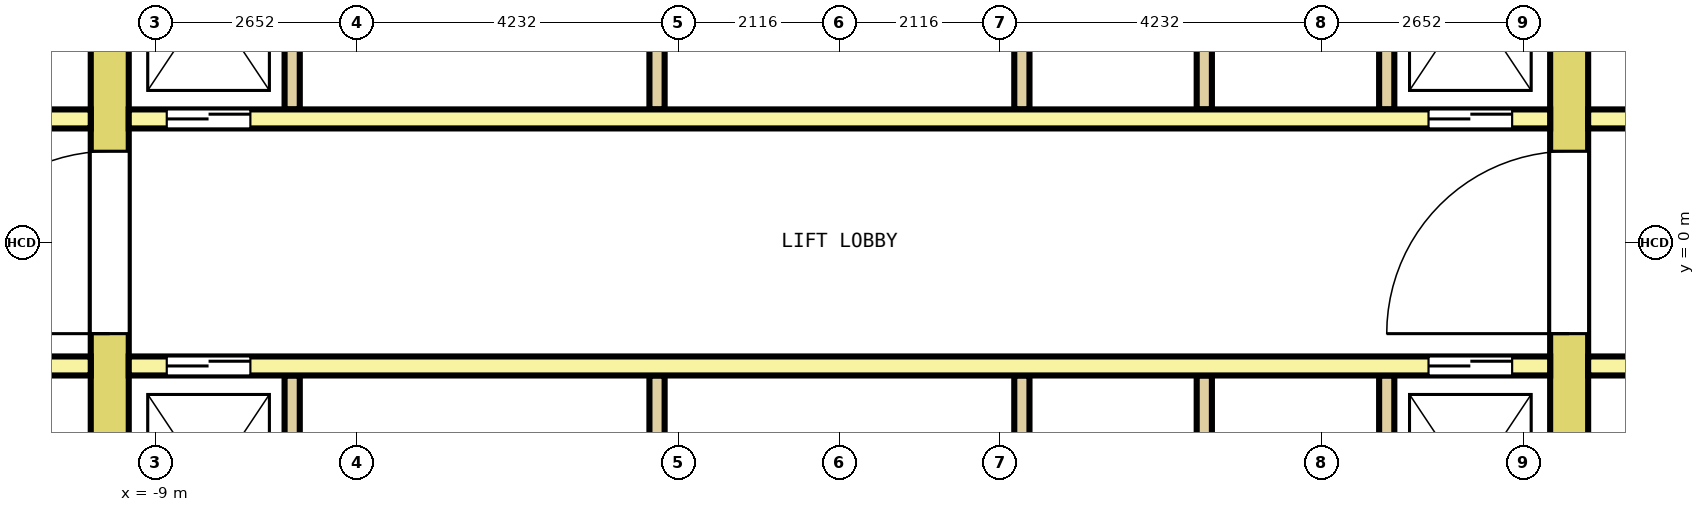
"""IFC4 building model, lengths in metres.
Left out: names, types, materials, properties, quantities, classifications, styles, units other than length and angle.
Written with IfcOpenShell. Run it as: python <this file> out.ifc"""

import sys

from ifc_helpers import new_model, si_unit, direction, frame, frame_2d, origin, place, context, subcontext, project, spatial, rectangle, extrude, element, fill, save


model = new_model("IFC4")
c1 = context("Model", 3, precision=1e-05, world=origin(), true_north=direction((0.0, 1.0)))
c2 = subcontext(c1, "Body", "Model", "MODEL_VIEW")
j1 = project(units=[si_unit("LENGTHUNIT", "METRE"), si_unit("PLANEANGLEUNIT", "RADIAN")], contexts=[c1])
p1 = place(None, origin())
s1 = spatial("IfcSite", under=j1, at=p1, CompositionType="ELEMENT")
p2 = place(p1, origin())
s2 = spatial("IfcBuilding", under=s1, at=p2, CompositionType="ELEMENT")
p3 = place(p2, frame((0.0, 0.0, 67.4)))
s3 = spatial("IfcBuildingStorey", under=s2, at=p3, CompositionType="ELEMENT", Elevation=67.4)
p4 = place(p3, frame((-9.6, -7.7, 0.0), z_axis=(0.0, 0.0, 1.0), x_axis=(0.0, 1.0, 0.0)))
e1 = element("IfcWall", 1, at=p4, inside=s3, PredefinedType="SHEAR", context=c2, shape_type="SweptSolid", body=[
    extrude(rectangle(XDim=15.4, YDim=0.5, at=frame_2d((7.7, 0.0))), origin(), (0.0, 0.0, 1.0), 4.1),
])
p5 = place(p4, frame((6.5, 0.0, 0.0)))
e2 = element("IfcOpeningElement", 2, at=p5, cuts=e1, PredefinedType="OPENING", context=c2, shape_type="SweptSolid", body=[
    extrude(rectangle(XDim=2.4, YDim=2.1, at=frame_2d((1.2, 1.05))), frame((0.0, 0.26, 0.0), z_axis=(0.0, -1.0, 0.0), x_axis=(1.0, 0.0, 0.0)), (0.0, 0.0, 1.0), 0.52),
])
p6 = place(p4, frame((13.4, 0.0, 0.0)))
e3 = element("IfcOpeningElement", 3, at=p6, cuts=e1, PredefinedType="OPENING", context=c2, shape_type="SweptSolid", body=[
    extrude(rectangle(XDim=1.2, YDim=2.1, at=frame_2d((0.6, 1.05))), frame((0.0, 0.26, 0.0), z_axis=(0.0, -1.0, 0.0), x_axis=(1.0, 0.0, 0.0)), (0.0, 0.0, 1.0), 0.52),
])
p7 = place(p4, frame((0.8, 0.0, 0.0)))
e4 = element("IfcOpeningElement", 4, at=p7, cuts=e1, PredefinedType="OPENING", context=c2, shape_type="SweptSolid", body=[
    extrude(rectangle(XDim=1.2, YDim=2.1, at=frame_2d((0.6, 1.05))), frame((0.0, 0.26, 0.0), z_axis=(0.0, -1.0, 0.0), x_axis=(1.0, 0.0, 0.0)), (0.0, 0.0, 1.0), 0.52),
])
p8 = place(p3, frame((9.6, -7.7, 0.0), z_axis=(0.0, 0.0, 1.0), x_axis=(0.0, 1.0, 0.0)))
e5 = element("IfcWall", 5, at=p8, inside=s3, PredefinedType="SHEAR", context=c2, shape_type="SweptSolid", body=[
    extrude(rectangle(XDim=15.4, YDim=0.5, at=frame_2d((7.7, 0.0))), origin(), (0.0, 0.0, 1.0), 4.1),
])
p9 = place(p8, frame((6.5, 0.0, 0.0)))
e6 = element("IfcOpeningElement", 6, at=p9, cuts=e5, PredefinedType="OPENING", context=c2, shape_type="SweptSolid", body=[
    extrude(rectangle(XDim=2.4, YDim=2.1, at=frame_2d((1.2, 1.05))), frame((0.0, 0.26, 0.0), z_axis=(0.0, -1.0, 0.0), x_axis=(1.0, 0.0, 0.0)), (0.0, 0.0, 1.0), 0.52),
])
p10 = place(p8, frame((13.4, 0.0, 0.0)))
e7 = element("IfcOpeningElement", 7, at=p10, cuts=e5, PredefinedType="OPENING", context=c2, shape_type="SweptSolid", body=[
    extrude(rectangle(XDim=1.2, YDim=2.1, at=frame_2d((0.6, 1.05))), frame((0.0, 0.26, 0.0), z_axis=(0.0, -1.0, 0.0), x_axis=(1.0, 0.0, 0.0)), (0.0, 0.0, 1.0), 0.52),
])
p11 = place(p8, frame((0.9, 0.0, 0.0)))
e8 = element("IfcOpeningElement", 8, at=p11, cuts=e5, PredefinedType="OPENING", context=c2, shape_type="SweptSolid", body=[
    extrude(rectangle(XDim=1.0, YDim=2.1, at=frame_2d((0.5, 1.05))), frame((0.0, 0.26, 0.0), z_axis=(0.0, -1.0, 0.0), x_axis=(1.0, 0.0, 0.0)), (0.0, 0.0, 1.0), 0.52),
])
p12 = place(p3, frame((-12.75, 1.625, 0.0), z_axis=(0.0, 0.0, 1.0), x_axis=(1.0, 0.0, 0.0)))
e9 = element("IfcWall", 9, at=p12, inside=s3, PredefinedType="SOLIDWALL", context=c2, shape_type="SweptSolid", body=[
    extrude(rectangle(XDim=2.9, YDim=0.25, at=frame_2d((1.45, 0.0))), origin(), (0.0, 0.0, 1.0), 4.1),
])
p13 = place(p12, frame((0.9, 0.0, 0.0)))
e10 = element("IfcOpeningElement", 10, at=p13, cuts=e9, PredefinedType="OPENING", context=c2, shape_type="SweptSolid", body=[
    extrude(rectangle(XDim=1.1, YDim=2.1, at=frame_2d((0.55, 1.05))), frame((0.0, 0.135, 0.0), z_axis=(0.0, -1.0, 0.0), x_axis=(1.0, 0.0, 0.0)), (0.0, 0.0, 1.0), 0.27),
])
p14 = place(p3, frame((-9.35, 1.625, 0.0), z_axis=(0.0, 0.0, 1.0), x_axis=(1.0, 0.0, 0.0)))
e11 = element("IfcWall", 11, at=p14, inside=s3, PredefinedType="SOLIDWALL", context=c2, shape_type="SweptSolid", body=[
    extrude(rectangle(XDim=18.7, YDim=0.25, at=frame_2d((9.35, 0.0))), origin(), (0.0, 0.0, 1.0), 4.1),
])
p15 = place(p14, frame((0.5, 0.0, 0.0)))
e12 = element("IfcOpeningElement", 12, at=p15, cuts=e11, PredefinedType="OPENING", context=c2, shape_type="SweptSolid", body=[
    extrude(rectangle(XDim=1.1, YDim=2.1, at=frame_2d((0.55, 1.05))), frame((0.0, 0.135, 0.0), z_axis=(0.0, -1.0, 0.0), x_axis=(1.0, 0.0, 0.0)), (0.0, 0.0, 1.0), 0.27),
])
p16 = place(p14, frame((17.1, 0.0, 0.0)))
e13 = element("IfcOpeningElement", 13, at=p16, cuts=e11, PredefinedType="OPENING", context=c2, shape_type="SweptSolid", body=[
    extrude(rectangle(XDim=1.1, YDim=2.1, at=frame_2d((0.55, 1.05))), frame((0.0, 0.135, 0.0), z_axis=(0.0, -1.0, 0.0), x_axis=(1.0, 0.0, 0.0)), (0.0, 0.0, 1.0), 0.27),
])
p17 = place(p3, frame((9.85, 1.625, 0.0), z_axis=(0.0, 0.0, 1.0), x_axis=(1.0, 0.0, 0.0)))
e14 = element("IfcWall", 14, at=p17, inside=s3, PredefinedType="SOLIDWALL", context=c2, shape_type="SweptSolid", body=[
    extrude(rectangle(XDim=2.9, YDim=0.25, at=frame_2d((1.45, 0.0))), origin(), (0.0, 0.0, 1.0), 4.1),
])
p18 = place(p17, frame((0.9, 0.0, 0.0)))
e15 = element("IfcOpeningElement", 15, at=p18, cuts=e14, PredefinedType="OPENING", context=c2, shape_type="SweptSolid", body=[
    extrude(rectangle(XDim=1.1, YDim=2.1, at=frame_2d((0.55, 1.05))), frame((0.0, 0.135, 0.0), z_axis=(0.0, -1.0, 0.0), x_axis=(1.0, 0.0, 0.0)), (0.0, 0.0, 1.0), 0.27),
])
for number, where, z_axis, x_axis in (
    (16, (-7.2, 1.75, 0.0), (0.0, 0.0, 1.0), (0.0, 1.0, 0.0)),
    (17, (-2.4, 1.75, 0.0), (0.0, 0.0, 1.0), (0.0, 1.0, 0.0)),
    (18, (2.4, 1.75, 0.0), (0.0, 0.0, 1.0), (0.0, 1.0, 0.0)),
    (19, (4.8, 1.75, 0.0), (0.0, 0.0, 1.0), (0.0, 1.0, 0.0)),
    (20, (7.2, 1.75, 0.0), (0.0, 0.0, 1.0), (0.0, 1.0, 0.0)),
):
    element("IfcWall", number, at=place(p3, frame(where, z_axis=z_axis, x_axis=x_axis)), inside=s3, PredefinedType="SOLIDWALL", context=c2, shape_type="SweptSolid", body=[
        extrude(rectangle(XDim=2.9, YDim=0.2, at=frame_2d((1.45, 0.0))), origin(), (0.0, 0.0, 1.0), 4.1),
    ])
p19 = place(p3, frame((-12.75, -1.625, 0.0), z_axis=(0.0, 0.0, 1.0), x_axis=(1.0, 0.0, 0.0)))
e21 = element("IfcWall", 21, at=p19, inside=s3, PredefinedType="SOLIDWALL", context=c2, shape_type="SweptSolid", body=[
    extrude(rectangle(XDim=2.9, YDim=0.25, at=frame_2d((1.45, 0.0))), origin(), (0.0, 0.0, 1.0), 4.1),
])
p20 = place(p19, frame((0.9, 0.0, 0.0)))
e22 = element("IfcOpeningElement", 22, at=p20, cuts=e21, PredefinedType="OPENING", context=c2, shape_type="SweptSolid", body=[
    extrude(rectangle(XDim=1.1, YDim=2.1, at=frame_2d((0.55, 1.05))), frame((0.0, 0.135, 0.0), z_axis=(0.0, -1.0, 0.0), x_axis=(1.0, 0.0, 0.0)), (0.0, 0.0, 1.0), 0.27),
])
p21 = place(p3, frame((-9.35, -1.625, 0.0), z_axis=(0.0, 0.0, 1.0), x_axis=(1.0, 0.0, 0.0)))
e23 = element("IfcWall", 23, at=p21, inside=s3, PredefinedType="SOLIDWALL", context=c2, shape_type="SweptSolid", body=[
    extrude(rectangle(XDim=18.7, YDim=0.25, at=frame_2d((9.35, 0.0))), origin(), (0.0, 0.0, 1.0), 4.1),
])
p22 = place(p21, frame((0.5, 0.0, 0.0)))
e24 = element("IfcOpeningElement", 24, at=p22, cuts=e23, PredefinedType="OPENING", context=c2, shape_type="SweptSolid", body=[
    extrude(rectangle(XDim=1.1, YDim=2.1, at=frame_2d((0.55, 1.05))), frame((0.0, 0.135, 0.0), z_axis=(0.0, -1.0, 0.0), x_axis=(1.0, 0.0, 0.0)), (0.0, 0.0, 1.0), 0.27),
])
p23 = place(p21, frame((17.1, 0.0, 0.0)))
e25 = element("IfcOpeningElement", 25, at=p23, cuts=e23, PredefinedType="OPENING", context=c2, shape_type="SweptSolid", body=[
    extrude(rectangle(XDim=1.1, YDim=2.1, at=frame_2d((0.55, 1.05))), frame((0.0, 0.135, 0.0), z_axis=(0.0, -1.0, 0.0), x_axis=(1.0, 0.0, 0.0)), (0.0, 0.0, 1.0), 0.27),
])
p24 = place(p3, frame((9.85, -1.625, 0.0), z_axis=(0.0, 0.0, 1.0), x_axis=(1.0, 0.0, 0.0)))
e26 = element("IfcWall", 26, at=p24, inside=s3, PredefinedType="SOLIDWALL", context=c2, shape_type="SweptSolid", body=[
    extrude(rectangle(XDim=2.9, YDim=0.25, at=frame_2d((1.45, 0.0))), origin(), (0.0, 0.0, 1.0), 4.1),
])
p25 = place(p24, frame((0.9, 0.0, 0.0)))
e27 = element("IfcOpeningElement", 27, at=p25, cuts=e26, PredefinedType="OPENING", context=c2, shape_type="SweptSolid", body=[
    extrude(rectangle(XDim=1.1, YDim=2.1, at=frame_2d((0.55, 1.05))), frame((0.0, 0.135, 0.0), z_axis=(0.0, -1.0, 0.0), x_axis=(1.0, 0.0, 0.0)), (0.0, 0.0, 1.0), 0.27),
])
for number, where, z_axis, x_axis in (
    (28, (-7.2, -4.65, 0.0), (0.0, 0.0, 1.0), (0.0, 1.0, 0.0)),
    (29, (-2.4, -4.65, 0.0), (0.0, 0.0, 1.0), (0.0, 1.0, 0.0)),
    (30, (2.4, -4.65, 0.0), (0.0, 0.0, 1.0), (0.0, 1.0, 0.0)),
    (31, (4.8, -4.65, 0.0), (0.0, 0.0, 1.0), (0.0, 1.0, 0.0)),
    (32, (7.2, -4.65, 0.0), (0.0, 0.0, 1.0), (0.0, 1.0, 0.0)),
):
    element("IfcWall", number, at=place(p3, frame(where, z_axis=z_axis, x_axis=x_axis)), inside=s3, PredefinedType="SOLIDWALL", context=c2, shape_type="SweptSolid", body=[
        extrude(rectangle(XDim=2.9, YDim=0.2, at=frame_2d((1.45, 0.0))), origin(), (0.0, 0.0, 1.0), 4.1),
    ])
p26 = place(p15, origin())
e33 = element("IfcDoor", 33, at=p26, inside=s3, OperationType="DOUBLE_DOOR_SLIDING", PredefinedType="DOOR", context=c2, shape_type="SweptSolid", body=[
    extrude(rectangle(XDim=1.1, YDim=2.1, at=frame_2d((0.55, 1.05))), frame((0.0, 0.075, 0.0), z_axis=(0.0, -1.0, 0.0), x_axis=(1.0, 0.0, 0.0)), (0.0, 0.0, 1.0), 0.15),
])
fill(e12, e33)
p27 = place(p16, origin())
e34 = element("IfcDoor", 34, at=p27, inside=s3, OperationType="DOUBLE_DOOR_SLIDING", PredefinedType="DOOR", context=c2, shape_type="SweptSolid", body=[
    extrude(rectangle(XDim=1.1, YDim=2.1, at=frame_2d((0.55, 1.05))), frame((0.0, 0.075, 0.0), z_axis=(0.0, -1.0, 0.0), x_axis=(1.0, 0.0, 0.0)), (0.0, 0.0, 1.0), 0.15),
])
fill(e13, e34)
p28 = place(p22, origin())
e35 = element("IfcDoor", 35, at=p28, inside=s3, OperationType="DOUBLE_DOOR_SLIDING", PredefinedType="DOOR", context=c2, shape_type="SweptSolid", body=[
    extrude(rectangle(XDim=1.1, YDim=2.1, at=frame_2d((0.55, 1.05))), frame((0.0, 0.075, 0.0), z_axis=(0.0, -1.0, 0.0), x_axis=(1.0, 0.0, 0.0)), (0.0, 0.0, 1.0), 0.15),
])
fill(e24, e35)
p29 = place(p23, origin())
e36 = element("IfcDoor", 36, at=p29, inside=s3, OperationType="DOUBLE_DOOR_SLIDING", PredefinedType="DOOR", context=c2, shape_type="SweptSolid", body=[
    extrude(rectangle(XDim=1.1, YDim=2.1, at=frame_2d((0.55, 1.05))), frame((0.0, 0.075, 0.0), z_axis=(0.0, -1.0, 0.0), x_axis=(1.0, 0.0, 0.0)), (0.0, 0.0, 1.0), 0.15),
])
fill(e25, e36)
p30 = place(p5, origin())
e37 = element("IfcDoor", 37, at=p30, inside=s3, OperationType="DOUBLE_DOOR_SINGLE_SWING", PredefinedType="DOOR", context=c2, shape_type="SweptSolid", body=[
    extrude(rectangle(XDim=2.4, YDim=2.1, at=frame_2d((1.2, 1.05))), frame((0.0, 0.2, 0.0), z_axis=(0.0, -1.0, 0.0), x_axis=(1.0, 0.0, 0.0)), (0.0, 0.0, 1.0), 0.4),
])
fill(e2, e37)
p31 = place(p9, origin())
e38 = element("IfcDoor", 38, at=p31, inside=s3, OperationType="DOUBLE_DOOR_SINGLE_SWING", PredefinedType="DOOR", context=c2, shape_type="SweptSolid", body=[
    extrude(rectangle(XDim=2.4, YDim=2.1, at=frame_2d((1.2, 1.05))), frame((0.0, 0.2, 0.0), z_axis=(0.0, -1.0, 0.0), x_axis=(1.0, 0.0, 0.0)), (0.0, 0.0, 1.0), 0.4),
])
fill(e6, e38)
save(model, sys.argv[1])
